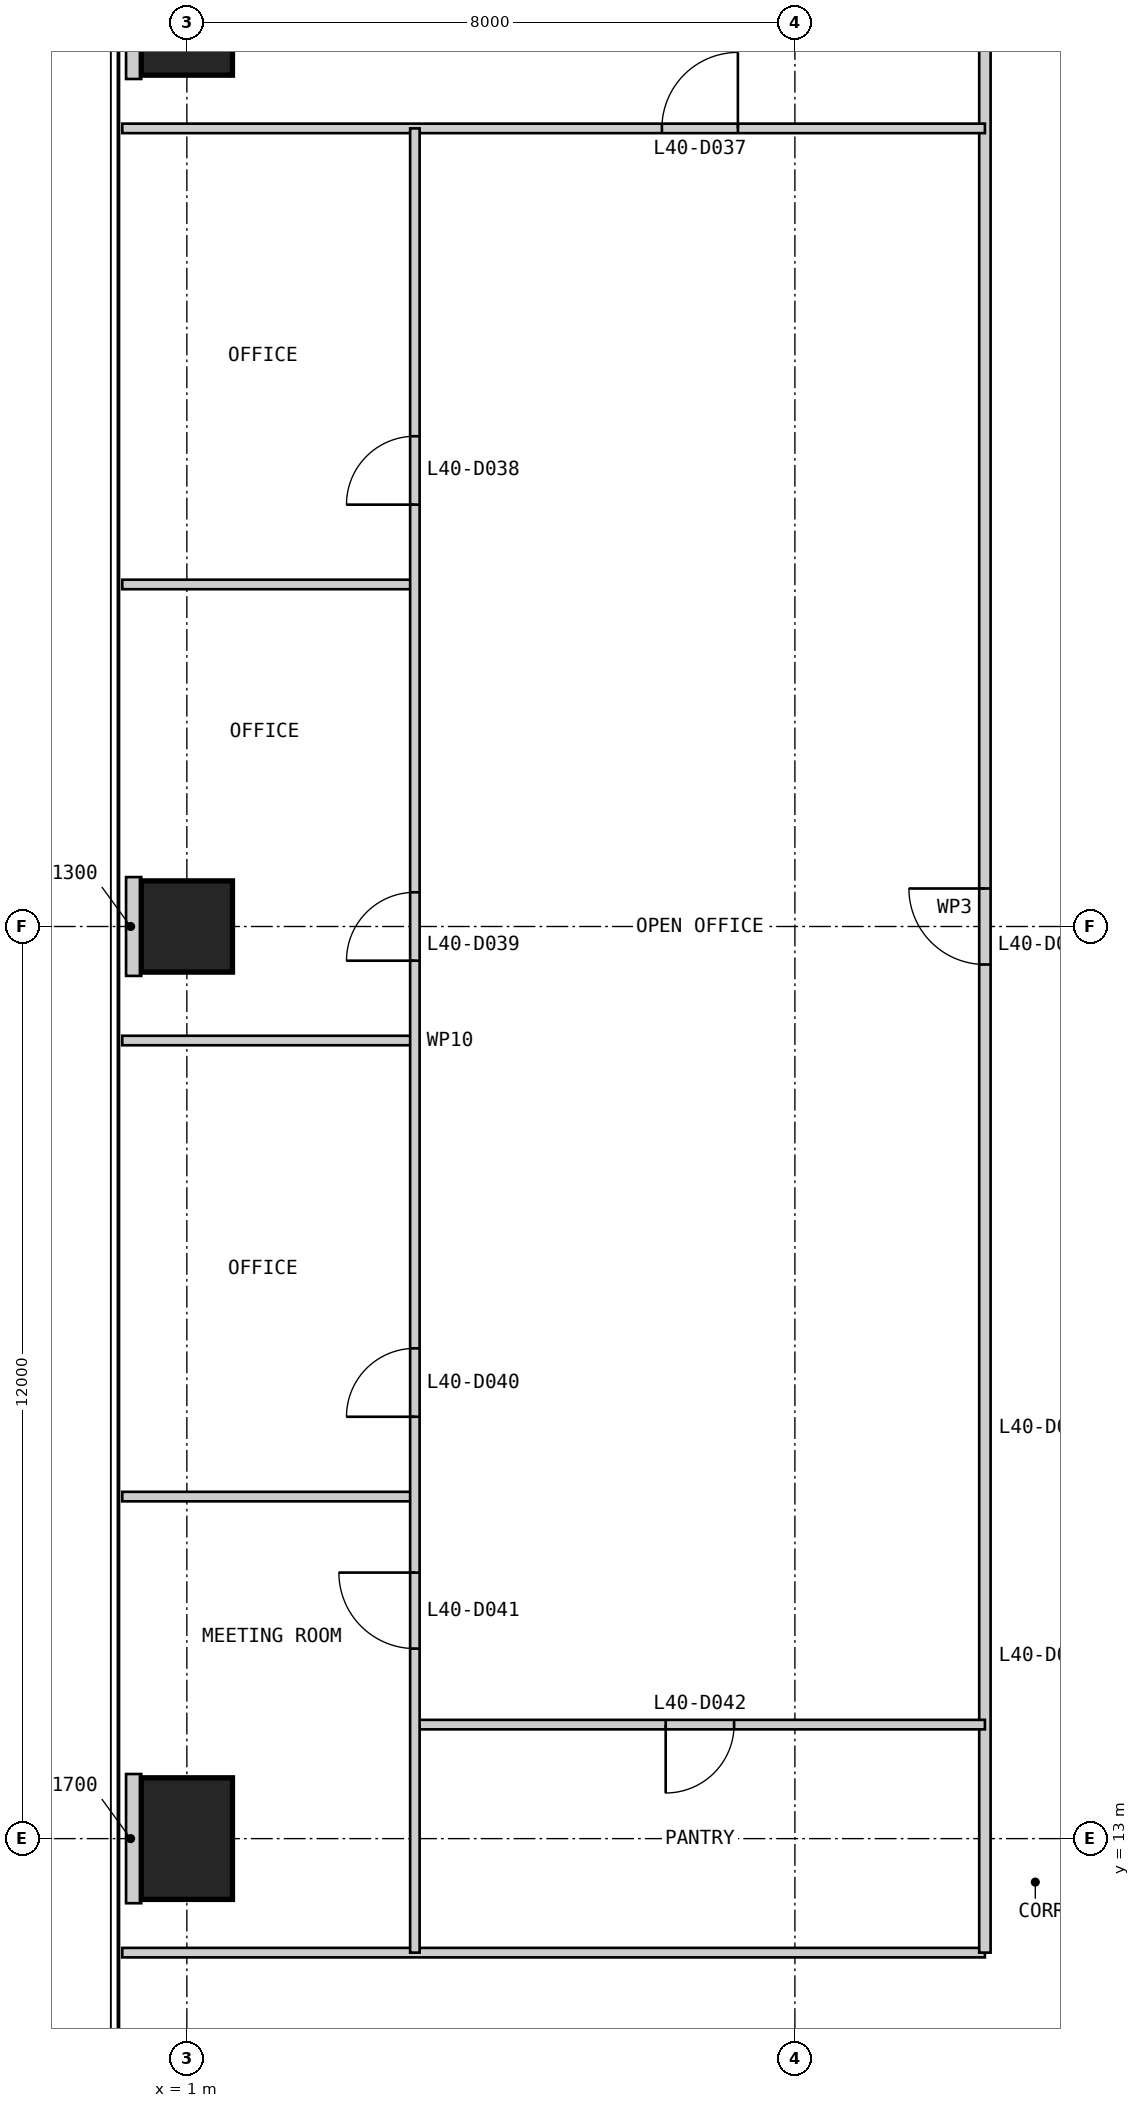
"""IFC4 building model, lengths in metres.
Left out: names, types, materials, properties, quantities, classifications, styles, units other than length and angle.
Written with IfcOpenShell. Run it as: python <this file> out.ifc"""

import sys

from ifc_helpers import new_model, si_unit, direction, frame, frame_2d, origin, origin_2d, place, context, subcontext, project, spatial, rectangle, extrude, element, fill, save


model = new_model("IFC4")
c1 = context("Model", 3, precision=1e-05, world=origin(), true_north=direction((0.0, 1.0)))
c2 = subcontext(c1, "Body", "Model", "MODEL_VIEW")
j1 = project(units=[si_unit("LENGTHUNIT", "METRE"), si_unit("PLANEANGLEUNIT", "RADIAN")], contexts=[c1])
p1 = place(None, origin())
s1 = spatial("IfcSite", under=j1, at=p1, CompositionType="ELEMENT")
p2 = place(p1, origin())
s2 = spatial("IfcBuilding", under=s1, at=p2, CompositionType="ELEMENT")
p3 = place(p2, frame((0.0, 0.0, 173.8)))
s3 = spatial("IfcBuildingStorey", under=s2, at=p3, CompositionType="ELEMENT", Elevation=173.8)
p4 = place(p3, frame((1.0, 37.0, 0.0), z_axis=(0.0, 0.0, 1.0), x_axis=(1.0, 0.0, 0.0)))
e1 = element("IfcColumn", 1, at=p4, inside=s3, PredefinedType="COLUMN", context=c2, shape_type="SweptSolid", body=[
    extrude(rectangle(XDim=1.2, YDim=1.6, at=origin_2d()), origin(), (0.0, 0.0, 1.0), 4.0),
])
p5 = place(p3, frame((1.0, 25.0, 0.0), z_axis=(0.0, 0.0, 1.0), x_axis=(1.0, 0.0, 0.0)))
e2 = element("IfcColumn", 2, at=p5, inside=s3, PredefinedType="COLUMN", context=c2, shape_type="SweptSolid", body=[
    extrude(rectangle(XDim=1.2, YDim=1.2, at=origin_2d()), origin(), (0.0, 0.0, 1.0), 4.0),
])
p6 = place(p3, frame((1.0, 13.0, 0.0), z_axis=(0.0, 0.0, 1.0), x_axis=(1.0, 0.0, 0.0)))
e3 = element("IfcColumn", 3, at=p6, inside=s3, PredefinedType="COLUMN", context=c2, shape_type="SweptSolid", body=[
    extrude(rectangle(XDim=1.2, YDim=1.6, at=origin_2d()), origin(), (0.0, 0.0, 1.0), 4.0),
])
p7 = place(p3, frame((0.15, 11.5, 0.0), z_axis=(0.0, 0.0, 1.0), x_axis=(1.0, 0.0, 0.0)))
e4 = element("IfcWall", 4, at=p7, inside=s3, PredefinedType="PARTITIONING", context=c2, shape_type="SweptSolid", body=[
    extrude(rectangle(XDim=11.35, YDim=0.125, at=frame_2d((5.675, 0.0))), origin(), (0.0, 0.0, 1.0), 3.85),
])
p8 = place(p3, frame((11.5, 38.5, 0.0), z_axis=(0.0, 0.0, 1.0), x_axis=(0.0, -1.0, 0.0)))
e5 = element("IfcWall", 5, at=p8, inside=s3, PredefinedType="PARTITIONING", context=c2, shape_type="SweptSolid", body=[
    extrude(rectangle(XDim=27.0, YDim=0.15, at=frame_2d((13.5, 0.0))), origin(), (0.0, 0.0, 1.0), 3.85),
])
p9 = place(p8, frame((13.0, 0.0, 0.0)))
e6 = element("IfcOpeningElement", 6, at=p9, cuts=e5, PredefinedType="OPENING", context=c2, shape_type="SweptSolid", body=[
    extrude(rectangle(XDim=1.0, YDim=2.2, at=frame_2d((0.5, 1.1))), frame((0.0, 0.085, 0.0), z_axis=(0.0, -1.0, 0.0), x_axis=(1.0, 0.0, 0.0)), (0.0, 0.0, 1.0), 0.17),
])
p10 = place(p3, frame((0.15, 35.5, 0.0), z_axis=(0.0, 0.0, 1.0), x_axis=(1.0, 0.0, 0.0)))
e7 = element("IfcWall", 7, at=p10, inside=s3, PredefinedType="PARTITIONING", context=c2, shape_type="SweptSolid", body=[
    extrude(rectangle(XDim=11.35, YDim=0.125, at=frame_2d((5.675, 0.0))), origin(), (0.0, 0.0, 1.0), 3.85),
])
p11 = place(p10, frame((7.1, 0.0, 0.0)))
e8 = element("IfcOpeningElement", 8, at=p11, cuts=e7, PredefinedType="OPENING", context=c2, shape_type="SweptSolid", body=[
    extrude(rectangle(XDim=1.0, YDim=2.2, at=frame_2d((0.5, 1.1))), frame((0.0, 0.073, 0.0), z_axis=(0.0, -1.0, 0.0), x_axis=(1.0, 0.0, 0.0)), (0.0, 0.0, 1.0), 0.145),
])
for number, where, z_axis, x_axis in (
    (9, (0.15, 29.5, 0.0), (0.0, 0.0, 1.0), (1.0, 0.0, 0.0)),
    (10, (0.15, 23.5, 0.0), (0.0, 0.0, 1.0), (1.0, 0.0, 0.0)),
    (11, (0.15, 17.5, 0.0), (0.0, 0.0, 1.0), (1.0, 0.0, 0.0)),
):
    element("IfcWall", number, at=place(p3, frame(where, z_axis=z_axis, x_axis=x_axis)), inside=s3, PredefinedType="PARTITIONING", context=c2, shape_type="SweptSolid", body=[
        extrude(rectangle(XDim=3.85, YDim=0.125, at=frame_2d((1.925, 0.0))), origin(), (0.0, 0.0, 1.0), 3.85),
    ])
p12 = place(p3, frame((4.0, 14.5, 0.0), z_axis=(0.0, 0.0, 1.0), x_axis=(1.0, 0.0, 0.0)))
e12 = element("IfcWall", 12, at=p12, inside=s3, PredefinedType="PARTITIONING", context=c2, shape_type="SweptSolid", body=[
    extrude(rectangle(XDim=7.5, YDim=0.125, at=frame_2d((3.75, 0.0))), origin(), (0.0, 0.0, 1.0), 3.85),
])
p13 = place(p12, frame((3.3, 0.0, 0.0)))
e13 = element("IfcOpeningElement", 13, at=p13, cuts=e12, PredefinedType="OPENING", context=c2, shape_type="SweptSolid", body=[
    extrude(rectangle(XDim=0.9, YDim=2.2, at=frame_2d((0.45, 1.1))), frame((0.0, 0.073, 0.0), z_axis=(0.0, -1.0, 0.0), x_axis=(1.0, 0.0, 0.0)), (0.0, 0.0, 1.0), 0.145),
])
p14 = place(p3, frame((4.0, 35.5, 0.0), z_axis=(0.0, 0.0, 1.0), x_axis=(0.0, -1.0, 0.0)))
e14 = element("IfcWall", 14, at=p14, inside=s3, PredefinedType="PARTITIONING", context=c2, shape_type="SweptSolid", body=[
    extrude(rectangle(XDim=24.0, YDim=0.125, at=frame_2d((12.0, 0.0))), origin(), (0.0, 0.0, 1.0), 3.238),
])
p15 = place(p14, frame((4.05, 0.0, 0.0)))
e15 = element("IfcOpeningElement", 15, at=p15, cuts=e14, PredefinedType="OPENING", context=c2, shape_type="SweptSolid", body=[
    extrude(rectangle(XDim=0.9, YDim=2.2, at=frame_2d((0.45, 1.1))), frame((0.0, 0.073, 0.0), z_axis=(0.0, -1.0, 0.0), x_axis=(1.0, 0.0, 0.0)), (0.0, 0.0, 1.0), 0.145),
])
p16 = place(p14, frame((10.05, 0.0, 0.0)))
e16 = element("IfcOpeningElement", 16, at=p16, cuts=e14, PredefinedType="OPENING", context=c2, shape_type="SweptSolid", body=[
    extrude(rectangle(XDim=0.9, YDim=2.2, at=frame_2d((0.45, 1.1))), frame((0.0, 0.073, 0.0), z_axis=(0.0, -1.0, 0.0), x_axis=(1.0, 0.0, 0.0)), (0.0, 0.0, 1.0), 0.145),
])
p17 = place(p14, frame((16.05, 0.0, 0.0)))
e17 = element("IfcOpeningElement", 17, at=p17, cuts=e14, PredefinedType="OPENING", context=c2, shape_type="SweptSolid", body=[
    extrude(rectangle(XDim=0.9, YDim=2.2, at=frame_2d((0.45, 1.1))), frame((0.0, 0.073, 0.0), z_axis=(0.0, -1.0, 0.0), x_axis=(1.0, 0.0, 0.0)), (0.0, 0.0, 1.0), 0.145),
])
p18 = place(p14, frame((19.0, 0.0, 0.0)))
e18 = element("IfcOpeningElement", 18, at=p18, cuts=e14, PredefinedType="OPENING", context=c2, shape_type="SweptSolid", body=[
    extrude(rectangle(XDim=1.0, YDim=2.2, at=frame_2d((0.5, 1.1))), frame((0.0, 0.073, 0.0), z_axis=(0.0, -1.0, 0.0), x_axis=(1.0, 0.0, 0.0)), (0.0, 0.0, 1.0), 0.145),
])
p19 = place(p3, frame((0.2, 37.0, 0.0), z_axis=(0.0, 0.0, 1.0), x_axis=(1.0, 0.0, 0.0)))
e19 = element("IfcWall", 19, at=p19, inside=s3, PredefinedType="PARTITIONING", context=c2, shape_type="SweptSolid", body=[
    extrude(rectangle(XDim=0.2, YDim=1.7, at=frame_2d((0.1, 0.0))), origin(), (0.0, 0.0, 1.0), 3.85),
])
p20 = place(p3, frame((0.2, 25.0, 0.0), z_axis=(0.0, 0.0, 1.0), x_axis=(1.0, 0.0, 0.0)))
e20 = element("IfcWall", 20, at=p20, inside=s3, PredefinedType="PARTITIONING", context=c2, shape_type="SweptSolid", body=[
    extrude(rectangle(XDim=0.2, YDim=1.3, at=frame_2d((0.1, 0.0))), origin(), (0.0, 0.0, 1.0), 3.85),
])
p21 = place(p3, frame((0.2, 13.0, 0.0), z_axis=(0.0, 0.0, 1.0), x_axis=(1.0, 0.0, 0.0)))
e21 = element("IfcWall", 21, at=p21, inside=s3, PredefinedType="PARTITIONING", context=c2, shape_type="SweptSolid", body=[
    extrude(rectangle(XDim=0.2, YDim=1.7, at=frame_2d((0.1, 0.0))), origin(), (0.0, 0.0, 1.0), 3.85),
])
p22 = place(p9, frame((1.0, 0.0, 0.0), z_axis=(0.0, 0.0, 1.0), x_axis=(-1.0, 0.0, 0.0)))
e22 = element("IfcDoor", 22, at=p22, inside=s3, OperationType="SINGLE_SWING_RIGHT", PredefinedType="DOOR", context=c2, shape_type="SweptSolid", body=[
    extrude(rectangle(XDim=1.0, YDim=2.2, at=frame_2d((0.5, 1.1))), frame((0.0, 0.025, 0.0), z_axis=(0.0, -1.0, 0.0), x_axis=(1.0, 0.0, 0.0)), (0.0, 0.0, 1.0), 0.05),
])
fill(e6, e22)
p23 = place(p11, origin())
e23 = element("IfcDoor", 23, at=p23, inside=s3, OperationType="SINGLE_SWING_RIGHT", PredefinedType="DOOR", context=c2, shape_type="SweptSolid", body=[
    extrude(rectangle(XDim=1.0, YDim=2.2, at=frame_2d((0.5, 1.1))), frame((0.0, 0.025, 0.0), z_axis=(0.0, -1.0, 0.0), x_axis=(1.0, 0.0, 0.0)), (0.0, 0.0, 1.0), 0.05),
])
fill(e8, e23)
p24 = place(p15, frame((0.9, 0.0, 0.0), z_axis=(0.0, 0.0, 1.0), x_axis=(-1.0, 0.0, 0.0)))
e24 = element("IfcDoor", 24, at=p24, inside=s3, OperationType="SINGLE_SWING_LEFT", PredefinedType="DOOR", context=c2, shape_type="SweptSolid", body=[
    extrude(rectangle(XDim=0.9, YDim=2.2, at=frame_2d((0.45, 1.1))), frame((0.0, 0.025, 0.0), z_axis=(0.0, -1.0, 0.0), x_axis=(1.0, 0.0, 0.0)), (0.0, 0.0, 1.0), 0.05),
])
fill(e15, e24)
p25 = place(p16, frame((0.9, 0.0, 0.0), z_axis=(0.0, 0.0, 1.0), x_axis=(-1.0, 0.0, 0.0)))
e25 = element("IfcDoor", 25, at=p25, inside=s3, OperationType="SINGLE_SWING_LEFT", PredefinedType="DOOR", context=c2, shape_type="SweptSolid", body=[
    extrude(rectangle(XDim=0.9, YDim=2.2, at=frame_2d((0.45, 1.1))), frame((0.0, 0.025, 0.0), z_axis=(0.0, -1.0, 0.0), x_axis=(1.0, 0.0, 0.0)), (0.0, 0.0, 1.0), 0.05),
])
fill(e16, e25)
p26 = place(p17, frame((0.9, 0.0, 0.0), z_axis=(0.0, 0.0, 1.0), x_axis=(-1.0, 0.0, 0.0)))
e26 = element("IfcDoor", 26, at=p26, inside=s3, OperationType="SINGLE_SWING_LEFT", PredefinedType="DOOR", context=c2, shape_type="SweptSolid", body=[
    extrude(rectangle(XDim=0.9, YDim=2.2, at=frame_2d((0.45, 1.1))), frame((0.0, 0.025, 0.0), z_axis=(0.0, -1.0, 0.0), x_axis=(1.0, 0.0, 0.0)), (0.0, 0.0, 1.0), 0.05),
])
fill(e17, e26)
p27 = place(p18, frame((1.0, 0.0, 0.0), z_axis=(0.0, 0.0, 1.0), x_axis=(-1.0, 0.0, 0.0)))
e27 = element("IfcDoor", 27, at=p27, inside=s3, OperationType="SINGLE_SWING_RIGHT", PredefinedType="DOOR", context=c2, shape_type="SweptSolid", body=[
    extrude(rectangle(XDim=1.0, YDim=2.2, at=frame_2d((0.5, 1.1))), frame((0.0, 0.025, 0.0), z_axis=(0.0, -1.0, 0.0), x_axis=(1.0, 0.0, 0.0)), (0.0, 0.0, 1.0), 0.05),
])
fill(e18, e27)
p28 = place(p13, frame((0.9, 0.0, 0.0), z_axis=(0.0, 0.0, 1.0), x_axis=(-1.0, 0.0, 0.0)))
e28 = element("IfcDoor", 28, at=p28, inside=s3, OperationType="SINGLE_SWING_RIGHT", PredefinedType="DOOR", context=c2, shape_type="SweptSolid", body=[
    extrude(rectangle(XDim=0.9, YDim=2.2, at=frame_2d((0.45, 1.1))), frame((0.0, 0.025, 0.0), z_axis=(0.0, -1.0, 0.0), x_axis=(1.0, 0.0, 0.0)), (0.0, 0.0, 1.0), 0.05),
])
fill(e13, e28)
save(model, sys.argv[1])
